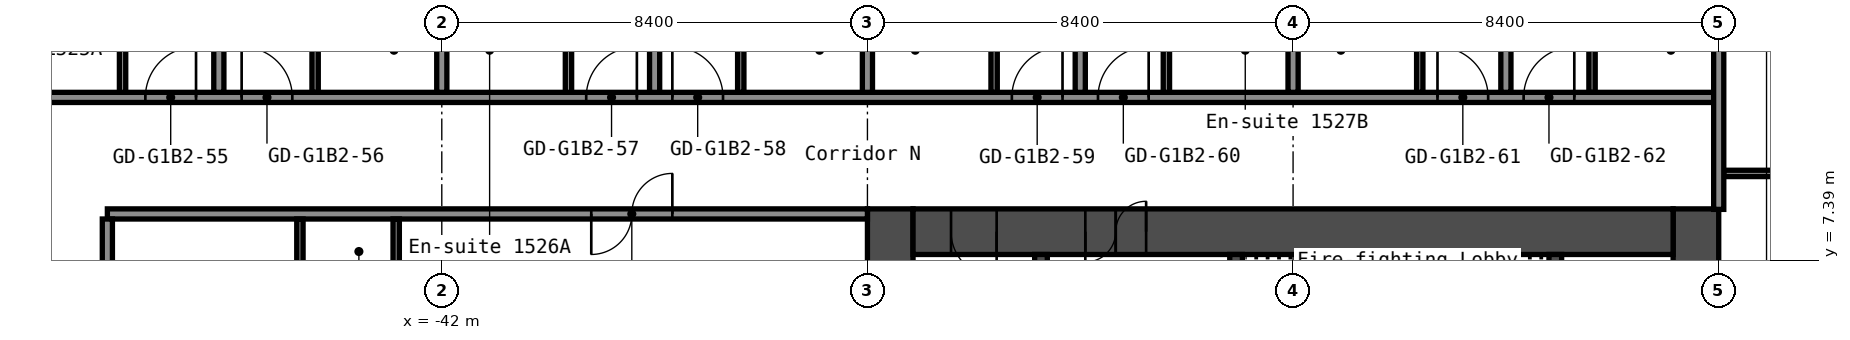
"""IFC4 building model, lengths in metres.
Left out: names, types, materials, properties, quantities, classifications, styles, units other than length and angle.
Written with IfcOpenShell. Run it as: python <this file> out.ifc"""

import sys

from ifc_helpers import new_model, si_unit, direction, frame, frame_2d, origin, place, context, subcontext, project, spatial, rectangle, extrude, element, fill, save


model = new_model("IFC4")
c1 = context("Model", 3, precision=1e-05, world=origin(), true_north=direction((0.0, 1.0)))
c2 = subcontext(c1, "Body", "Model", "MODEL_VIEW")
j1 = project(units=[si_unit("LENGTHUNIT", "METRE"), si_unit("PLANEANGLEUNIT", "RADIAN")], contexts=[c1])
p1 = place(None, origin())
s1 = spatial("IfcSite", under=j1, at=p1, CompositionType="ELEMENT")
p2 = place(p1, origin())
s2 = spatial("IfcBuilding", under=s1, at=p2, CompositionType="ELEMENT")
p3 = place(p2, frame((0.0, 0.0, 55.0)))
s3 = spatial("IfcBuildingStorey", under=s2, at=p3, CompositionType="ELEMENT", Elevation=55.0)
p4 = place(p3, frame((-17.25, -8.4, 0.0), z_axis=(0.0, 0.0, 1.0), x_axis=(0.0, 1.0, 0.0)))
e1 = element("IfcWall", 1, at=p4, inside=s3, PredefinedType="SHEAR", context=c2, shape_type="SweptSolid", body=[
    extrude(rectangle(XDim=16.8, YDim=0.9, at=frame_2d((8.4, 0.0))), origin(), (0.0, 0.0, 1.0), 2.8),
])
p5 = place(p4, frame((12.75, 0.0, 0.0)))
e2 = element("IfcOpeningElement", 2, at=p5, cuts=e1, PredefinedType="OPENING", context=c2, shape_type="SweptSolid", body=[
    extrude(rectangle(XDim=1.2, YDim=2.1, at=frame_2d((0.6, 1.05))), frame((0.0, 0.46, 0.0), z_axis=(0.0, -1.0, 0.0), x_axis=(1.0, 0.0, 0.0)), (0.0, 0.0, 1.0), 0.92),
])
p6 = place(p4, frame((2.85, 0.0, 0.0)))
e3 = element("IfcOpeningElement", 3, at=p6, cuts=e1, PredefinedType="OPENING", context=c2, shape_type="SweptSolid", body=[
    extrude(rectangle(XDim=1.2, YDim=2.1, at=frame_2d((0.6, 1.05))), frame((0.0, 0.46, 0.0), z_axis=(0.0, -1.0, 0.0), x_axis=(1.0, 0.0, 0.0)), (0.0, 0.0, 1.0), 0.92),
])
p7 = place(p3, frame((-33.15, -8.4, 0.0), z_axis=(0.0, 0.0, 1.0), x_axis=(0.0, 1.0, 0.0)))
e4 = element("IfcWall", 4, at=p7, inside=s3, PredefinedType="SHEAR", context=c2, shape_type="SweptSolid", body=[
    extrude(rectangle(XDim=16.8, YDim=0.9, at=frame_2d((8.4, 0.0))), origin(), (0.0, 0.0, 1.0), 2.8),
])
p8 = place(p3, frame((-32.7, 7.95, 0.0), z_axis=(0.0, 0.0, 1.0), x_axis=(1.0, 0.0, 0.0)))
e5 = element("IfcWall", 5, at=p8, inside=s3, PredefinedType="SHEAR", context=c2, shape_type="SweptSolid", body=[
    extrude(rectangle(XDim=15.0, YDim=0.9, at=frame_2d((7.5, 0.0))), origin(), (0.0, 0.0, 1.0), 2.8),
])
p9 = place(p8, frame((3.4, 0.0, 0.0)))
e6 = element("IfcOpeningElement", 6, at=p9, cuts=e5, PredefinedType="OPENING", context=c2, shape_type="SweptSolid", body=[
    extrude(rectangle(XDim=1.2, YDim=2.1, at=frame_2d((0.6, 1.05))), frame((0.0, 0.46, 0.0), z_axis=(0.0, -1.0, 0.0), x_axis=(1.0, 0.0, 0.0)), (0.0, 0.0, 1.0), 0.92),
])
p10 = place(p8, frame((0.75, 0.0, 0.0)))
e7 = element("IfcOpeningElement", 7, at=p10, cuts=e5, PredefinedType="OPENING", context=c2, shape_type="SweptSolid", body=[
    extrude(rectangle(XDim=0.9, YDim=2.1, at=frame_2d((0.45, 1.05))), frame((0.0, 0.46, 0.0), z_axis=(0.0, -1.0, 0.0), x_axis=(1.0, 0.0, 0.0)), (0.0, 0.0, 1.0), 0.92),
])
p11 = place(p3, frame((-20.025, 1.2, 0.0), z_axis=(0.0, 0.0, 1.0), x_axis=(0.0, 1.0, 0.0)))
e8 = element("IfcWall", 8, at=p11, inside=s3, PredefinedType="SHEAR", context=c2, shape_type="SweptSolid", body=[
    extrude(rectangle(XDim=6.3, YDim=0.25, at=frame_2d((3.15, 0.0))), origin(), (0.0, 0.0, 1.0), 2.8),
])
p12 = place(p3, frame((-26.325, 3.75, 0.0), z_axis=(0.0, 0.0, 1.0), x_axis=(0.0, 1.0, 0.0)))
e9 = element("IfcWall", 9, at=p12, inside=s3, PredefinedType="SHEAR", context=c2, shape_type="SweptSolid", body=[
    extrude(rectangle(XDim=3.75, YDim=0.25, at=frame_2d((1.875, 0.0))), origin(), (0.0, 0.0, 1.0), 2.8),
])
p13 = place(p12, frame((1.25, 0.0, 0.0)))
e10 = element("IfcOpeningElement", 10, at=p13, cuts=e9, PredefinedType="OPENING", context=c2, shape_type="SweptSolid", body=[
    extrude(rectangle(XDim=1.2, YDim=2.1, at=frame_2d((0.6, 1.05))), frame((0.0, 0.135, 0.0), z_axis=(0.0, -1.0, 0.0), x_axis=(1.0, 0.0, 0.0)), (0.0, 0.0, 1.0), 0.27),
])
p14 = place(p3, frame((-30.175, 1.45, 0.0), z_axis=(0.0, 0.0, 1.0), x_axis=(0.0, 1.0, 0.0)))
e11 = element("IfcWall", 11, at=p14, inside=s3, PredefinedType="SHEAR", context=c2, shape_type="SweptSolid", body=[
    extrude(rectangle(XDim=6.05, YDim=0.25, at=frame_2d((3.025, 0.0))), origin(), (0.0, 0.0, 1.0), 2.8),
])
p15 = place(p14, frame((2.625, 0.0, 0.0)))
e12 = element("IfcOpeningElement", 12, at=p15, cuts=e11, PredefinedType="OPENING", context=c2, shape_type="SweptSolid", body=[
    extrude(rectangle(XDim=1.1, YDim=2.1, at=frame_2d((0.55, 1.05))), frame((0.0, 0.135, 0.0), z_axis=(0.0, -1.0, 0.0), x_axis=(1.0, 0.0, 0.0)), (0.0, 0.0, 1.0), 0.27),
])
p16 = place(p3, frame((-48.6, 8.3, 0.0), z_axis=(0.0, 0.0, 1.0), x_axis=(1.0, 0.0, 0.0)))
e13 = element("IfcWall", 13, at=p16, inside=s3, PredefinedType="PARTITIONING", context=c2, shape_type="SweptSolid", body=[
    extrude(rectangle(XDim=15.0, YDim=0.2, at=frame_2d((7.5, 0.0))), origin(), (0.0, 0.0, 1.0), 2.8),
])
p17 = place(p16, frame((9.55, 0.0, 0.0)))
e14 = element("IfcOpeningElement", 14, at=p17, cuts=e13, PredefinedType="OPENING", context=c2, shape_type="SweptSolid", body=[
    extrude(rectangle(XDim=1.6, YDim=2.1, at=frame_2d((0.8, 1.05))), frame((0.0, 0.11, 0.0), z_axis=(0.0, -1.0, 0.0), x_axis=(1.0, 0.0, 0.0)), (0.0, 0.0, 1.0), 0.22),
])
p18 = place(p3, frame((-16.7, 9.1, 0.0), z_axis=(0.0, 0.0, 1.0), x_axis=(1.0, 0.0, 0.0)))
e15 = element("IfcWall", 15, at=p18, inside=s3, PredefinedType="PARTITIONING", context=c2, shape_type="SweptSolid", body=[
    extrude(rectangle(XDim=2.337, YDim=0.125, at=frame_2d((1.169, 0.0))), origin(), (0.0, 0.0, 1.0), 2.8),
])
p19 = place(p3, frame((-51.1, 10.6, 0.0), z_axis=(0.0, 0.0, 1.0), x_axis=(1.0, 0.0, 0.0)))
e16 = element("IfcWall", 16, at=p19, inside=s3, PredefinedType="PARTITIONING", context=c2, shape_type="SweptSolid", body=[
    extrude(rectangle(XDim=34.3, YDim=0.2, at=frame_2d((17.15, 0.0))), origin(), (0.0, 0.0, 1.0), 2.8),
])
p20 = place(p19, frame((3.25, 0.0, 0.0)))
e17 = element("IfcOpeningElement", 17, at=p20, cuts=e16, PredefinedType="OPENING", context=c2, shape_type="SweptSolid", body=[
    extrude(rectangle(XDim=1.0, YDim=2.1, at=frame_2d((0.5, 1.05))), frame((0.0, 0.11, 0.0), z_axis=(0.0, -1.0, 0.0), x_axis=(1.0, 0.0, 0.0)), (0.0, 0.0, 1.0), 0.22),
])
p21 = place(p19, frame((5.15, 0.0, 0.0)))
e18 = element("IfcOpeningElement", 18, at=p21, cuts=e16, PredefinedType="OPENING", context=c2, shape_type="SweptSolid", body=[
    extrude(rectangle(XDim=1.0, YDim=2.1, at=frame_2d((0.5, 1.05))), frame((0.0, 0.11, 0.0), z_axis=(0.0, -1.0, 0.0), x_axis=(1.0, 0.0, 0.0)), (0.0, 0.0, 1.0), 0.22),
])
p22 = place(p19, frame((11.95, 0.0, 0.0)))
e19 = element("IfcOpeningElement", 19, at=p22, cuts=e16, PredefinedType="OPENING", context=c2, shape_type="SweptSolid", body=[
    extrude(rectangle(XDim=1.0, YDim=2.1, at=frame_2d((0.5, 1.05))), frame((0.0, 0.11, 0.0), z_axis=(0.0, -1.0, 0.0), x_axis=(1.0, 0.0, 0.0)), (0.0, 0.0, 1.0), 0.22),
])
p23 = place(p19, frame((13.65, 0.0, 0.0)))
e20 = element("IfcOpeningElement", 20, at=p23, cuts=e16, PredefinedType="OPENING", context=c2, shape_type="SweptSolid", body=[
    extrude(rectangle(XDim=1.0, YDim=2.1, at=frame_2d((0.5, 1.05))), frame((0.0, 0.11, 0.0), z_axis=(0.0, -1.0, 0.0), x_axis=(1.0, 0.0, 0.0)), (0.0, 0.0, 1.0), 0.22),
])
p24 = place(p19, frame((20.35, 0.0, 0.0)))
e21 = element("IfcOpeningElement", 21, at=p24, cuts=e16, PredefinedType="OPENING", context=c2, shape_type="SweptSolid", body=[
    extrude(rectangle(XDim=1.0, YDim=2.1, at=frame_2d((0.5, 1.05))), frame((0.0, 0.11, 0.0), z_axis=(0.0, -1.0, 0.0), x_axis=(1.0, 0.0, 0.0)), (0.0, 0.0, 1.0), 0.22),
])
p25 = place(p19, frame((22.05, 0.0, 0.0)))
e22 = element("IfcOpeningElement", 22, at=p25, cuts=e16, PredefinedType="OPENING", context=c2, shape_type="SweptSolid", body=[
    extrude(rectangle(XDim=1.0, YDim=2.1, at=frame_2d((0.5, 1.05))), frame((0.0, 0.11, 0.0), z_axis=(0.0, -1.0, 0.0), x_axis=(1.0, 0.0, 0.0)), (0.0, 0.0, 1.0), 0.22),
])
p26 = place(p19, frame((28.75, 0.0, 0.0)))
e23 = element("IfcOpeningElement", 23, at=p26, cuts=e16, PredefinedType="OPENING", context=c2, shape_type="SweptSolid", body=[
    extrude(rectangle(XDim=1.0, YDim=2.1, at=frame_2d((0.5, 1.05))), frame((0.0, 0.11, 0.0), z_axis=(0.0, -1.0, 0.0), x_axis=(1.0, 0.0, 0.0)), (0.0, 0.0, 1.0), 0.22),
])
p27 = place(p19, frame((30.45, 0.0, 0.0)))
e24 = element("IfcOpeningElement", 24, at=p27, cuts=e16, PredefinedType="OPENING", context=c2, shape_type="SweptSolid", body=[
    extrude(rectangle(XDim=1.0, YDim=2.1, at=frame_2d((0.5, 1.05))), frame((0.0, 0.11, 0.0), z_axis=(0.0, -1.0, 0.0), x_axis=(1.0, 0.0, 0.0)), (0.0, 0.0, 1.0), 0.22),
])
p28 = place(p3, frame((-48.6, -8.2, 0.0), z_axis=(0.0, 0.0, 1.0), x_axis=(0.0, 1.0, 0.0)))
e25 = element("IfcWall", 25, at=p28, inside=s3, PredefinedType="PARTITIONING", context=c2, shape_type="SweptSolid", body=[
    extrude(rectangle(XDim=16.4, YDim=0.2, at=frame_2d((8.2, 0.0))), origin(), (0.0, 0.0, 1.0), 2.8),
])
p29 = place(p3, frame((-48.3, 10.7, 0.0), z_axis=(0.0, 0.0, 1.0), x_axis=(0.0, 1.0, 0.0)))
e26 = element("IfcWall", 26, at=p29, inside=s3, PredefinedType="PARTITIONING", context=c2, shape_type="SweptSolid", body=[
    extrude(rectangle(XDim=2.9, YDim=0.125, at=frame_2d((1.45, 0.0))), origin(), (0.0, 0.0, 1.0), 2.8),
])
p30 = place(p29, frame((1.5, 0.0, 0.0)))
e27 = element("IfcOpeningElement", 27, at=p30, cuts=e26, PredefinedType="OPENING", context=c2, shape_type="SweptSolid", body=[
    extrude(rectangle(XDim=0.8, YDim=2.1, at=frame_2d((0.4, 1.05))), frame((0.0, 0.073, 0.0), z_axis=(0.0, -1.0, 0.0), x_axis=(1.0, 0.0, 0.0)), (0.0, 0.0, 1.0), 0.145),
])
p31 = place(p3, frame((-46.4, 10.7, 0.0), z_axis=(0.0, 0.0, 1.0), x_axis=(0.0, 1.0, 0.0)))
e28 = element("IfcWall", 28, at=p31, inside=s3, PredefinedType="PARTITIONING", context=c2, shape_type="SweptSolid", body=[
    extrude(rectangle(XDim=9.6, YDim=0.2, at=frame_2d((4.8, 0.0))), origin(), (0.0, 0.0, 1.0), 2.8),
])
p32 = place(p3, frame((-44.8, 4.9, 0.0), z_axis=(0.0, 0.0, 1.0), x_axis=(0.0, 1.0, 0.0)))
e29 = element("IfcWall", 29, at=p32, inside=s3, PredefinedType="PARTITIONING", context=c2, shape_type="SweptSolid", body=[
    extrude(rectangle(XDim=3.3, YDim=0.125, at=frame_2d((1.65, 0.0))), origin(), (0.0, 0.0, 1.0), 2.8),
])
p33 = place(p3, frame((-44.5, 10.7, 0.0), z_axis=(0.0, 0.0, 1.0), x_axis=(0.0, 1.0, 0.0)))
e30 = element("IfcWall", 30, at=p33, inside=s3, PredefinedType="PARTITIONING", context=c2, shape_type="SweptSolid", body=[
    extrude(rectangle(XDim=2.9, YDim=0.125, at=frame_2d((1.45, 0.0))), origin(), (0.0, 0.0, 1.0), 2.8),
])
p34 = place(p33, frame((1.5, 0.0, 0.0)))
e31 = element("IfcOpeningElement", 31, at=p34, cuts=e30, PredefinedType="OPENING", context=c2, shape_type="SweptSolid", body=[
    extrude(rectangle(XDim=0.8, YDim=2.1, at=frame_2d((0.4, 1.05))), frame((0.0, 0.073, 0.0), z_axis=(0.0, -1.0, 0.0), x_axis=(1.0, 0.0, 0.0)), (0.0, 0.0, 1.0), 0.145),
])
p35 = place(p3, frame((-42.9, 5.9, 0.0), z_axis=(0.0, 0.0, 1.0), x_axis=(0.0, 1.0, 0.0)))
e32 = element("IfcWall", 32, at=p35, inside=s3, PredefinedType="PARTITIONING", context=c2, shape_type="SweptSolid", body=[
    extrude(rectangle(XDim=2.3, YDim=0.125, at=frame_2d((1.15, 0.0))), origin(), (0.0, 0.0, 1.0), 2.8),
])
p36 = place(p3, frame((-42.0, 10.7, 0.0), z_axis=(0.0, 0.0, 1.0), x_axis=(0.0, 1.0, 0.0)))
e33 = element("IfcWall", 33, at=p36, inside=s3, PredefinedType="PARTITIONING", context=c2, shape_type="SweptSolid", body=[
    extrude(rectangle(XDim=9.6, YDim=0.2, at=frame_2d((4.8, 0.0))), origin(), (0.0, 0.0, 1.0), 2.8),
])
p37 = place(p3, frame((-39.5, 10.7, 0.0), z_axis=(0.0, 0.0, 1.0), x_axis=(0.0, 1.0, 0.0)))
e34 = element("IfcWall", 34, at=p37, inside=s3, PredefinedType="PARTITIONING", context=c2, shape_type="SweptSolid", body=[
    extrude(rectangle(XDim=2.9, YDim=0.125, at=frame_2d((1.45, 0.0))), origin(), (0.0, 0.0, 1.0), 2.8),
])
p38 = place(p37, frame((1.5, 0.0, 0.0)))
e35 = element("IfcOpeningElement", 35, at=p38, cuts=e34, PredefinedType="OPENING", context=c2, shape_type="SweptSolid", body=[
    extrude(rectangle(XDim=0.8, YDim=2.1, at=frame_2d((0.4, 1.05))), frame((0.0, 0.073, 0.0), z_axis=(0.0, -1.0, 0.0), x_axis=(1.0, 0.0, 0.0)), (0.0, 0.0, 1.0), 0.145),
])
p39 = place(p3, frame((-37.8, 10.7, 0.0), z_axis=(0.0, 0.0, 1.0), x_axis=(0.0, 1.0, 0.0)))
e36 = element("IfcWall", 36, at=p39, inside=s3, PredefinedType="PARTITIONING", context=c2, shape_type="SweptSolid", body=[
    extrude(rectangle(XDim=9.6, YDim=0.2, at=frame_2d((4.8, 0.0))), origin(), (0.0, 0.0, 1.0), 2.8),
])
p40 = place(p3, frame((-36.1, 10.7, 0.0), z_axis=(0.0, 0.0, 1.0), x_axis=(0.0, 1.0, 0.0)))
e37 = element("IfcWall", 37, at=p40, inside=s3, PredefinedType="PARTITIONING", context=c2, shape_type="SweptSolid", body=[
    extrude(rectangle(XDim=2.9, YDim=0.125, at=frame_2d((1.45, 0.0))), origin(), (0.0, 0.0, 1.0), 2.8),
])
p41 = place(p40, frame((1.5, 0.0, 0.0)))
e38 = element("IfcOpeningElement", 38, at=p41, cuts=e37, PredefinedType="OPENING", context=c2, shape_type="SweptSolid", body=[
    extrude(rectangle(XDim=0.8, YDim=2.1, at=frame_2d((0.4, 1.05))), frame((0.0, 0.073, 0.0), z_axis=(0.0, -1.0, 0.0), x_axis=(1.0, 0.0, 0.0)), (0.0, 0.0, 1.0), 0.145),
])
p42 = place(p3, frame((-33.6, 10.7, 0.0), z_axis=(0.0, 0.0, 1.0), x_axis=(0.0, 1.0, 0.0)))
e39 = element("IfcWall", 39, at=p42, inside=s3, PredefinedType="PARTITIONING", context=c2, shape_type="SweptSolid", body=[
    extrude(rectangle(XDim=9.6, YDim=0.2, at=frame_2d((4.8, 0.0))), origin(), (0.0, 0.0, 1.0), 2.8),
])
p43 = place(p3, frame((-31.1, 10.7, 0.0), z_axis=(0.0, 0.0, 1.0), x_axis=(0.0, 1.0, 0.0)))
e40 = element("IfcWall", 40, at=p43, inside=s3, PredefinedType="PARTITIONING", context=c2, shape_type="SweptSolid", body=[
    extrude(rectangle(XDim=2.9, YDim=0.125, at=frame_2d((1.45, 0.0))), origin(), (0.0, 0.0, 1.0), 2.8),
])
p44 = place(p43, frame((1.5, 0.0, 0.0)))
e41 = element("IfcOpeningElement", 41, at=p44, cuts=e40, PredefinedType="OPENING", context=c2, shape_type="SweptSolid", body=[
    extrude(rectangle(XDim=0.8, YDim=2.1, at=frame_2d((0.4, 1.05))), frame((0.0, 0.073, 0.0), z_axis=(0.0, -1.0, 0.0), x_axis=(1.0, 0.0, 0.0)), (0.0, 0.0, 1.0), 0.145),
])
p45 = place(p3, frame((-29.4, 10.7, 0.0), z_axis=(0.0, 0.0, 1.0), x_axis=(0.0, 1.0, 0.0)))
e42 = element("IfcWall", 42, at=p45, inside=s3, PredefinedType="PARTITIONING", context=c2, shape_type="SweptSolid", body=[
    extrude(rectangle(XDim=9.6, YDim=0.2, at=frame_2d((4.8, 0.0))), origin(), (0.0, 0.0, 1.0), 2.8),
])
p46 = place(p3, frame((-27.7, 10.7, 0.0), z_axis=(0.0, 0.0, 1.0), x_axis=(0.0, 1.0, 0.0)))
e43 = element("IfcWall", 43, at=p46, inside=s3, PredefinedType="PARTITIONING", context=c2, shape_type="SweptSolid", body=[
    extrude(rectangle(XDim=2.9, YDim=0.125, at=frame_2d((1.45, 0.0))), origin(), (0.0, 0.0, 1.0), 2.8),
])
p47 = place(p46, frame((1.5, 0.0, 0.0)))
e44 = element("IfcOpeningElement", 44, at=p47, cuts=e43, PredefinedType="OPENING", context=c2, shape_type="SweptSolid", body=[
    extrude(rectangle(XDim=0.8, YDim=2.1, at=frame_2d((0.4, 1.05))), frame((0.0, 0.073, 0.0), z_axis=(0.0, -1.0, 0.0), x_axis=(1.0, 0.0, 0.0)), (0.0, 0.0, 1.0), 0.145),
])
p48 = place(p3, frame((-25.2, 10.7, 0.0), z_axis=(0.0, 0.0, 1.0), x_axis=(0.0, 1.0, 0.0)))
e45 = element("IfcWall", 45, at=p48, inside=s3, PredefinedType="PARTITIONING", context=c2, shape_type="SweptSolid", body=[
    extrude(rectangle(XDim=9.6, YDim=0.2, at=frame_2d((4.8, 0.0))), origin(), (0.0, 0.0, 1.0), 2.8),
])
p49 = place(p3, frame((-22.7, 10.7, 0.0), z_axis=(0.0, 0.0, 1.0), x_axis=(0.0, 1.0, 0.0)))
e46 = element("IfcWall", 46, at=p49, inside=s3, PredefinedType="PARTITIONING", context=c2, shape_type="SweptSolid", body=[
    extrude(rectangle(XDim=2.9, YDim=0.125, at=frame_2d((1.45, 0.0))), origin(), (0.0, 0.0, 1.0), 2.8),
])
p50 = place(p49, frame((1.5, 0.0, 0.0)))
e47 = element("IfcOpeningElement", 47, at=p50, cuts=e46, PredefinedType="OPENING", context=c2, shape_type="SweptSolid", body=[
    extrude(rectangle(XDim=0.8, YDim=2.1, at=frame_2d((0.4, 1.05))), frame((0.0, 0.073, 0.0), z_axis=(0.0, -1.0, 0.0), x_axis=(1.0, 0.0, 0.0)), (0.0, 0.0, 1.0), 0.145),
])
p51 = place(p3, frame((-21.0, 10.7, 0.0), z_axis=(0.0, 0.0, 1.0), x_axis=(0.0, 1.0, 0.0)))
e48 = element("IfcWall", 48, at=p51, inside=s3, PredefinedType="PARTITIONING", context=c2, shape_type="SweptSolid", body=[
    extrude(rectangle(XDim=9.6, YDim=0.2, at=frame_2d((4.8, 0.0))), origin(), (0.0, 0.0, 1.0), 2.8),
])
p52 = place(p3, frame((-19.3, 10.7, 0.0), z_axis=(0.0, 0.0, 1.0), x_axis=(0.0, 1.0, 0.0)))
e49 = element("IfcWall", 49, at=p52, inside=s3, PredefinedType="PARTITIONING", context=c2, shape_type="SweptSolid", body=[
    extrude(rectangle(XDim=2.9, YDim=0.125, at=frame_2d((1.45, 0.0))), origin(), (0.0, 0.0, 1.0), 2.8),
])
p53 = place(p52, frame((1.5, 0.0, 0.0)))
e50 = element("IfcOpeningElement", 50, at=p53, cuts=e49, PredefinedType="OPENING", context=c2, shape_type="SweptSolid", body=[
    extrude(rectangle(XDim=0.8, YDim=2.1, at=frame_2d((0.4, 1.05))), frame((0.0, 0.073, 0.0), z_axis=(0.0, -1.0, 0.0), x_axis=(1.0, 0.0, 0.0)), (0.0, 0.0, 1.0), 0.145),
])
p54 = place(p3, frame((-16.8, 8.39, 0.0), z_axis=(0.0, 0.0, 1.0), x_axis=(0.0, 1.0, 0.0)))
e51 = element("IfcWall", 51, at=p54, inside=s3, PredefinedType="PARTITIONING", context=c2, shape_type="SweptSolid", body=[
    extrude(rectangle(XDim=11.91, YDim=0.2, at=frame_2d((5.955, 0.0))), origin(), (0.0, 0.0, 1.0), 2.8),
])
p55 = place(p9, origin())
e52 = element("IfcDoor", 52, at=p55, inside=s3, OperationType="DOUBLE_DOOR_SINGLE_SWING", PredefinedType="DOOR", context=c2, shape_type="SweptSolid", body=[
    extrude(rectangle(XDim=1.2, YDim=2.1, at=frame_2d((0.6, 1.05))), frame((0.0, 0.025, 0.0), z_axis=(0.0, -1.0, 0.0), x_axis=(1.0, 0.0, 0.0)), (0.0, 0.0, 1.0), 0.05),
])
fill(e6, e52)
p56 = place(p10, origin())
e53 = element("IfcDoor", 53, at=p56, inside=s3, OperationType="SINGLE_SWING_RIGHT", PredefinedType="DOOR", context=c2, shape_type="SweptSolid", body=[
    extrude(rectangle(XDim=0.9, YDim=2.1, at=frame_2d((0.45, 1.05))), frame((0.0, 0.025, 0.0), z_axis=(0.0, -1.0, 0.0), x_axis=(1.0, 0.0, 0.0)), (0.0, 0.0, 1.0), 0.05),
])
fill(e7, e53)
p57 = place(p17, origin())
e54 = element("IfcDoor", 54, at=p57, inside=s3, OperationType="DOUBLE_DOOR_SINGLE_SWING", PredefinedType="DOOR", context=c2, shape_type="SweptSolid", body=[
    extrude(rectangle(XDim=1.6, YDim=2.1, at=frame_2d((0.8, 1.05))), frame((0.0, 0.025, 0.0), z_axis=(0.0, -1.0, 0.0), x_axis=(1.0, 0.0, 0.0)), (0.0, 0.0, 1.0), 0.05),
])
fill(e14, e54)
p58 = place(p20, origin())
e55 = element("IfcDoor", 55, at=p58, inside=s3, OperationType="SINGLE_SWING_LEFT", PredefinedType="DOOR", context=c2, shape_type="SweptSolid", body=[
    extrude(rectangle(XDim=1.0, YDim=2.1, at=frame_2d((0.5, 1.05))), frame((0.0, 0.025, 0.0), z_axis=(0.0, -1.0, 0.0), x_axis=(1.0, 0.0, 0.0)), (0.0, 0.0, 1.0), 0.05),
])
fill(e17, e55)
p59 = place(p21, origin())
e56 = element("IfcDoor", 56, at=p59, inside=s3, OperationType="SINGLE_SWING_RIGHT", PredefinedType="DOOR", context=c2, shape_type="SweptSolid", body=[
    extrude(rectangle(XDim=1.0, YDim=2.1, at=frame_2d((0.5, 1.05))), frame((0.0, 0.025, 0.0), z_axis=(0.0, -1.0, 0.0), x_axis=(1.0, 0.0, 0.0)), (0.0, 0.0, 1.0), 0.05),
])
fill(e18, e56)
p60 = place(p22, origin())
e57 = element("IfcDoor", 57, at=p60, inside=s3, OperationType="SINGLE_SWING_LEFT", PredefinedType="DOOR", context=c2, shape_type="SweptSolid", body=[
    extrude(rectangle(XDim=1.0, YDim=2.1, at=frame_2d((0.5, 1.05))), frame((0.0, 0.025, 0.0), z_axis=(0.0, -1.0, 0.0), x_axis=(1.0, 0.0, 0.0)), (0.0, 0.0, 1.0), 0.05),
])
fill(e19, e57)
p61 = place(p23, origin())
e58 = element("IfcDoor", 58, at=p61, inside=s3, OperationType="SINGLE_SWING_RIGHT", PredefinedType="DOOR", context=c2, shape_type="SweptSolid", body=[
    extrude(rectangle(XDim=1.0, YDim=2.1, at=frame_2d((0.5, 1.05))), frame((0.0, 0.025, 0.0), z_axis=(0.0, -1.0, 0.0), x_axis=(1.0, 0.0, 0.0)), (0.0, 0.0, 1.0), 0.05),
])
fill(e20, e58)
p62 = place(p24, origin())
e59 = element("IfcDoor", 59, at=p62, inside=s3, OperationType="SINGLE_SWING_LEFT", PredefinedType="DOOR", context=c2, shape_type="SweptSolid", body=[
    extrude(rectangle(XDim=1.0, YDim=2.1, at=frame_2d((0.5, 1.05))), frame((0.0, 0.025, 0.0), z_axis=(0.0, -1.0, 0.0), x_axis=(1.0, 0.0, 0.0)), (0.0, 0.0, 1.0), 0.05),
])
fill(e21, e59)
p63 = place(p25, origin())
e60 = element("IfcDoor", 60, at=p63, inside=s3, OperationType="SINGLE_SWING_LEFT", PredefinedType="DOOR", context=c2, shape_type="SweptSolid", body=[
    extrude(rectangle(XDim=1.0, YDim=2.1, at=frame_2d((0.5, 1.05))), frame((0.0, 0.025, 0.0), z_axis=(0.0, -1.0, 0.0), x_axis=(1.0, 0.0, 0.0)), (0.0, 0.0, 1.0), 0.05),
])
fill(e22, e60)
p64 = place(p26, origin())
e61 = element("IfcDoor", 61, at=p64, inside=s3, OperationType="SINGLE_SWING_RIGHT", PredefinedType="DOOR", context=c2, shape_type="SweptSolid", body=[
    extrude(rectangle(XDim=1.0, YDim=2.1, at=frame_2d((0.5, 1.05))), frame((0.0, 0.025, 0.0), z_axis=(0.0, -1.0, 0.0), x_axis=(1.0, 0.0, 0.0)), (0.0, 0.0, 1.0), 0.05),
])
fill(e23, e61)
p65 = place(p27, origin())
e62 = element("IfcDoor", 62, at=p65, inside=s3, OperationType="SINGLE_SWING_LEFT", PredefinedType="DOOR", context=c2, shape_type="SweptSolid", body=[
    extrude(rectangle(XDim=1.0, YDim=2.1, at=frame_2d((0.5, 1.05))), frame((0.0, 0.025, 0.0), z_axis=(0.0, -1.0, 0.0), x_axis=(1.0, 0.0, 0.0)), (0.0, 0.0, 1.0), 0.05),
])
fill(e24, e62)
save(model, sys.argv[1])
